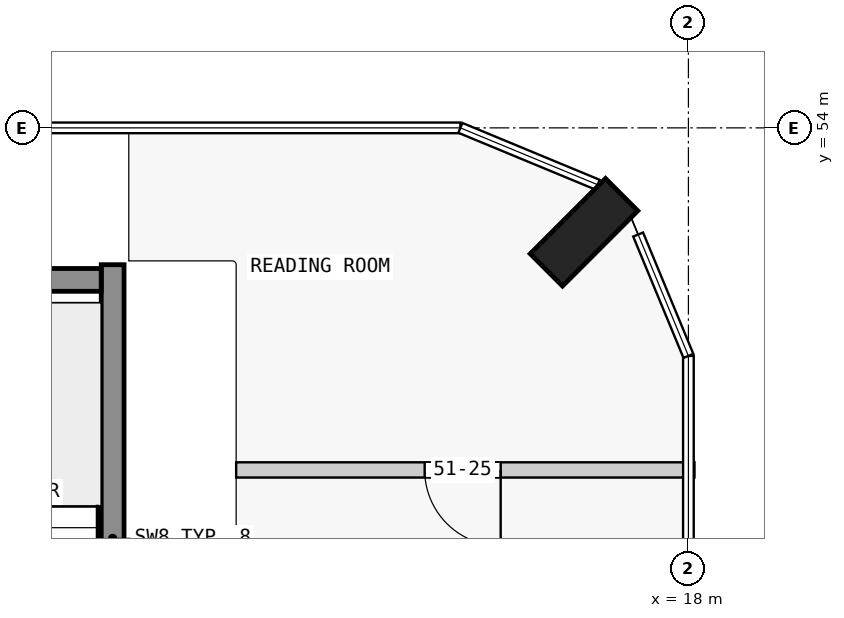
"""IFC4 building model, lengths in metres.
Left out: names, types, materials, properties, quantities, classifications, styles, units other than length and angle.
Written with IfcOpenShell. Run it as: python <this file> out.ifc"""

import sys

from ifc_helpers import new_model, si_unit, direction, frame, frame_2d, origin, origin_2d, place, context, subcontext, project, spatial, rectangle, extrude, element, fill, save


model = new_model("IFC4")
c1 = context("Model", 3, precision=1e-05, world=origin(), true_north=direction((0.0, 1.0)))
c2 = subcontext(c1, "Body", "Model", "MODEL_VIEW")
j1 = project(units=[si_unit("LENGTHUNIT", "METRE"), si_unit("PLANEANGLEUNIT", "RADIAN")], contexts=[c1])
p1 = place(None, origin())
s1 = spatial("IfcSite", under=j1, at=p1, CompositionType="ELEMENT")
p2 = place(p1, origin())
s2 = spatial("IfcBuilding", under=s1, at=p2, CompositionType="ELEMENT")
p3 = place(p2, frame((0.0, 0.0, 197.9)))
s3 = spatial("IfcBuildingStorey", under=s2, at=p3, CompositionType="ELEMENT", Elevation=197.9)
p4 = place(p3, frame((16.626, 52.626, 0.0), z_axis=(0.0, 0.0, 1.0), x_axis=(-0.707106781187, 0.707106781187, 0.0)))
e1 = element("IfcColumn", 1, at=p4, inside=s3, PredefinedType="COLUMN", context=c2, shape_type="SweptSolid", body=[
    extrude(rectangle(XDim=0.6, YDim=1.4, at=origin_2d()), origin(), (0.0, 0.0, 1.0), 3.5),
])
p5 = place(p3, frame((7.725, 52.0, 0.0), z_axis=(0.0, 0.0, 1.0), x_axis=(1.0, 0.0, 0.0)))
e2 = element("IfcWall", 2, at=p5, inside=s3, PredefinedType="SHEAR", context=c2, shape_type="SweptSolid", body=[
    extrude(rectangle(XDim=2.55, YDim=0.3, at=frame_2d((1.275, 0.0))), origin(), (0.0, 0.0, 1.0), 3.5),
])
p6 = place(p3, frame((10.425, 45.0, 0.0), z_axis=(0.0, 0.0, 1.0), x_axis=(0.0, 1.0, 0.0)))
e3 = element("IfcWall", 3, at=p6, inside=s3, PredefinedType="SHEAR", context=c2, shape_type="SweptSolid", body=[
    extrude(rectangle(XDim=7.2, YDim=0.3, at=frame_2d((3.6, 0.0))), origin(), (0.0, 0.0, 1.0), 3.5),
])
p7 = place(p3, frame((18.08, 49.5, 0.0), z_axis=(0.0, 0.0, 1.0), x_axis=(-1.0, 0.0, 0.0)))
e4 = element("IfcWall", 4, at=p7, inside=s3, PredefinedType="PARTITIONING", context=c2, shape_type="SweptSolid", body=[
    extrude(rectangle(XDim=6.03, YDim=0.2, at=frame_2d((3.015, 0.0))), origin(), (0.0, 0.0, 1.0), 3.25),
])
p8 = place(p7, frame((2.55, 0.0, 0.0)))
e5 = element("IfcOpeningElement", 5, at=p8, cuts=e4, PredefinedType="OPENING", context=c2, shape_type="SweptSolid", body=[
    extrude(rectangle(XDim=1.0, YDim=2.1, at=frame_2d((0.5, 1.05))), frame((0.0, 0.11, 0.0), z_axis=(0.0, -1.0, 0.0), x_axis=(1.0, 0.0, 0.0)), (0.0, 0.0, 1.0), 0.22),
])
p9 = place(p8, origin())
e6 = element("IfcDoor", 6, at=p9, inside=s3, OperationType="SINGLE_SWING_RIGHT", PredefinedType="DOOR", context=c2, shape_type="SweptSolid", body=[
    extrude(rectangle(XDim=1.0, YDim=2.1, at=frame_2d((0.5, 1.05))), frame((0.0, 0.025, 0.0), z_axis=(0.0, -1.0, 0.0), x_axis=(1.0, 0.0, 0.0)), (0.0, 0.0, 1.0), 0.05),
])
fill(e5, e6)
save(model, sys.argv[1])
